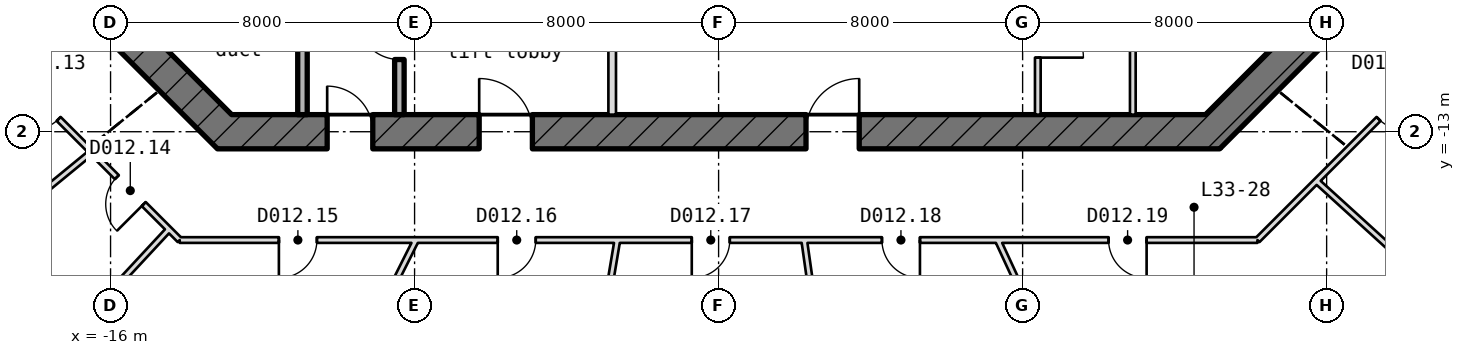
"""IFC4 building model, lengths in metres.
Left out: names, types, materials, properties, quantities, classifications, styles, units other than length and angle.
Written with IfcOpenShell. Run it as: python <this file> out.ifc"""

import sys

from ifc_helpers import new_model, si_unit, direction, frame, frame_2d, origin, place, context, subcontext, project, spatial, rectangle, extrude, element, fill, save


model = new_model("IFC4")
c1 = context("Model", 3, precision=1e-05, world=origin(), true_north=direction((0.0, 1.0)))
c2 = subcontext(c1, "Body", "Model", "MODEL_VIEW")
j1 = project(units=[si_unit("LENGTHUNIT", "METRE"), si_unit("PLANEANGLEUNIT", "RADIAN")], contexts=[c1])
p1 = place(None, origin())
s1 = spatial("IfcSite", under=j1, at=p1, CompositionType="ELEMENT")
p2 = place(p1, origin())
s2 = spatial("IfcBuilding", under=s1, at=p2, CompositionType="ELEMENT")
p3 = place(p2, frame((0.0, 0.0, 155.65)))
s3 = spatial("IfcBuildingStorey", under=s2, at=p3, CompositionType="ELEMENT", Elevation=155.65)
for number, where, z_axis, x_axis in (
    (1, (12.868, -13.132, -0.25), (0.0, 0.0, 1.0), (0.707, 0.707, 0.0)),
    (2, (-16.132, -9.868, -0.25), (0.0, 0.0, 1.0), (0.707, -0.707, 0.0)),
):
    element("IfcWall", number, at=place(p3, frame(where, z_axis=z_axis, x_axis=x_axis)), inside=s3, PredefinedType="SHEAR", context=c2, shape_type="SweptSolid", body=[
        extrude(rectangle(XDim=4.615, YDim=0.9, at=frame_2d((2.308, 0.0))), origin(), (0.0, 0.0, 1.0), 5.47),
    ])
p4 = place(p3, frame((-13.186, -13.0, -0.25), z_axis=(0.0, 0.0, 1.0), x_axis=(1.0, 0.0, 0.0)))
e3 = element("IfcWall", 3, at=p4, inside=s3, PredefinedType="SHEAR", context=c2, shape_type="SweptSolid", body=[
    extrude(rectangle(XDim=26.373, YDim=0.9, at=frame_2d((13.186, 0.0))), origin(), (0.0, 0.0, 1.0), 5.47),
])
p5 = place(p4, frame((2.886, 0.0, 0.25)))
e4 = element("IfcOpeningElement", 4, at=p5, cuts=e3, PredefinedType="OPENING", context=c2, shape_type="SweptSolid", body=[
    extrude(rectangle(XDim=1.2, YDim=2.1, at=frame_2d((0.6, 1.05))), frame((0.0, 0.46, 0.0), z_axis=(0.0, -1.0, 0.0), x_axis=(1.0, 0.0, 0.0)), (0.0, 0.0, 1.0), 0.92),
])
p6 = place(p4, frame((6.886, 0.0, 0.25)))
e5 = element("IfcOpeningElement", 5, at=p6, cuts=e3, PredefinedType="OPENING", context=c2, shape_type="SweptSolid", body=[
    extrude(rectangle(XDim=1.4, YDim=2.1, at=frame_2d((0.7, 1.05))), frame((0.0, 0.46, 0.0), z_axis=(0.0, -1.0, 0.0), x_axis=(1.0, 0.0, 0.0)), (0.0, 0.0, 1.0), 0.92),
])
p7 = place(p4, frame((15.486, 0.0, 0.25)))
e6 = element("IfcOpeningElement", 6, at=p7, cuts=e3, PredefinedType="OPENING", context=c2, shape_type="SweptSolid", body=[
    extrude(rectangle(XDim=1.4, YDim=2.1, at=frame_2d((0.7, 1.05))), frame((0.0, 0.46, 0.0), z_axis=(0.0, -1.0, 0.0), x_axis=(1.0, 0.0, 0.0)), (0.0, 0.0, 1.0), 0.92),
])
p8 = place(p3, frame((-10.95, -12.55, 0.0), z_axis=(0.0, 0.0, 1.0), x_axis=(0.0, 1.0, 0.0)))
e7 = element("IfcWall", 7, at=p8, inside=s3, PredefinedType="STANDARD", context=c2, shape_type="SweptSolid", body=[
    extrude(rectangle(XDim=3.675, YDim=0.25, at=frame_2d((1.837, 0.0))), origin(), (0.0, 0.0, 1.0), 5.22),
])
p9 = place(p3, frame((-8.4, -12.55, 0.0), z_axis=(0.0, 0.0, 1.0), x_axis=(0.0, 1.0, 0.0)))
e8 = element("IfcWall", 8, at=p9, inside=s3, PredefinedType="STANDARD", context=c2, shape_type="SweptSolid", body=[
    extrude(rectangle(XDim=3.8, YDim=0.25, at=frame_2d((1.9, 0.0))), origin(), (0.0, 0.0, 1.0), 5.22),
])
p10 = place(p9, frame((1.45, 0.0, 0.0)))
e9 = element("IfcOpeningElement", 9, at=p10, cuts=e8, PredefinedType="OPENING", context=c2, shape_type="SweptSolid", body=[
    extrude(rectangle(XDim=1.1, YDim=2.1, at=frame_2d((0.55, 1.05))), frame((0.0, 0.135, 0.0), z_axis=(0.0, -1.0, 0.0), x_axis=(1.0, 0.0, 0.0)), (0.0, 0.0, 1.0), 0.27),
])
p11 = place(p3, frame((-2.8, -12.55, 0.0), z_axis=(0.0, 0.0, 1.0), x_axis=(0.0, 1.0, 0.0)))
e10 = element("IfcWall", 10, at=p11, inside=s3, PredefinedType="PARTITIONING", context=c2, shape_type="SweptSolid", body=[
    extrude(rectangle(XDim=4.09, YDim=0.2, at=frame_2d((2.045, 0.0))), origin(), (0.0, 0.0, 1.0), 5.22),
])
p12 = place(p3, frame((8.4, -12.55, 0.0), z_axis=(0.0, 0.0, 1.0), x_axis=(0.0, 1.0, 0.0)))
e11 = element("IfcWall", 11, at=p12, inside=s3, PredefinedType="PARTITIONING", context=c2, shape_type="SweptSolid", body=[
    extrude(rectangle(XDim=4.2, YDim=0.15, at=frame_2d((2.1, 0.0))), origin(), (0.0, 0.0, 1.0), 5.22),
])
p13 = place(p12, frame((1.5, 0.0, 0.0)))
e12 = element("IfcOpeningElement", 12, at=p13, cuts=e11, PredefinedType="OPENING", context=c2, shape_type="SweptSolid", body=[
    extrude(rectangle(XDim=1.2, YDim=2.1, at=frame_2d((0.6, 1.05))), frame((0.0, 0.085, 0.0), z_axis=(0.0, -1.0, 0.0), x_axis=(1.0, 0.0, 0.0)), (0.0, 0.0, 1.0), 0.17),
])
p14 = place(p3, frame((10.9, -12.55, 0.0), z_axis=(0.0, 0.0, 1.0), x_axis=(0.0, 1.0, 0.0)))
e13 = element("IfcWall", 13, at=p14, inside=s3, PredefinedType="PARTITIONING", context=c2, shape_type="SweptSolid", body=[
    extrude(rectangle(XDim=10.125, YDim=0.15, at=frame_2d((5.062, 0.0))), origin(), (0.0, 0.0, 1.0), 5.22),
])
p15 = place(p14, frame((7.775, 0.0, 0.0)))
e14 = element("IfcOpeningElement", 14, at=p15, cuts=e13, PredefinedType="OPENING", context=c2, shape_type="SweptSolid", body=[
    extrude(rectangle(XDim=1.0, YDim=2.1, at=frame_2d((0.5, 1.05))), frame((0.0, 0.085, 0.0), z_axis=(0.0, -1.0, 0.0), x_axis=(1.0, 0.0, 0.0)), (0.0, 0.0, 1.0), 0.17),
])
p16 = place(p14, frame((2.675, 0.0, 0.0)))
e15 = element("IfcOpeningElement", 15, at=p16, cuts=e13, PredefinedType="OPENING", context=c2, shape_type="SweptSolid", body=[
    extrude(rectangle(XDim=1.0, YDim=2.1, at=frame_2d((0.5, 1.05))), frame((0.0, 0.085, 0.0), z_axis=(0.0, -1.0, 0.0), x_axis=(1.0, 0.0, 0.0)), (0.0, 0.0, 1.0), 0.17),
])
p17 = place(p3, frame((-14.18, -15.85, 0.0), z_axis=(0.0, 0.0, 1.0), x_axis=(1.0, 0.0, 0.0)))
e16 = element("IfcWall", 16, at=p17, inside=s3, PredefinedType="PARTITIONING", context=c2, shape_type="SweptSolid", body=[
    extrude(rectangle(XDim=28.361, YDim=0.15, at=frame_2d((14.18, 0.0))), origin(), (0.0, 0.0, 1.0), 5.22),
])
p18 = place(p17, frame((2.61, 0.0, 0.0)))
e17 = element("IfcOpeningElement", 17, at=p18, cuts=e16, PredefinedType="OPENING", context=c2, shape_type="SweptSolid", body=[
    extrude(rectangle(XDim=1.0, YDim=2.1, at=frame_2d((0.5, 1.05))), frame((0.0, 0.085, 0.0), z_axis=(0.0, -1.0, 0.0), x_axis=(1.0, 0.0, 0.0)), (0.0, 0.0, 1.0), 0.17),
])
p19 = place(p17, frame((8.368, 0.0, 0.0)))
e18 = element("IfcOpeningElement", 18, at=p19, cuts=e16, PredefinedType="OPENING", context=c2, shape_type="SweptSolid", body=[
    extrude(rectangle(XDim=1.0, YDim=2.1, at=frame_2d((0.5, 1.05))), frame((0.0, 0.085, 0.0), z_axis=(0.0, -1.0, 0.0), x_axis=(1.0, 0.0, 0.0)), (0.0, 0.0, 1.0), 0.17),
])
p20 = place(p17, frame((13.475, 0.0, 0.0)))
e19 = element("IfcOpeningElement", 19, at=p20, cuts=e16, PredefinedType="OPENING", context=c2, shape_type="SweptSolid", body=[
    extrude(rectangle(XDim=1.0, YDim=2.1, at=frame_2d((0.5, 1.05))), frame((0.0, 0.085, 0.0), z_axis=(0.0, -1.0, 0.0), x_axis=(1.0, 0.0, 0.0)), (0.0, 0.0, 1.0), 0.17),
])
p21 = place(p17, frame((18.479, 0.0, 0.0)))
e20 = element("IfcOpeningElement", 20, at=p21, cuts=e16, PredefinedType="OPENING", context=c2, shape_type="SweptSolid", body=[
    extrude(rectangle(XDim=1.0, YDim=2.1, at=frame_2d((0.5, 1.05))), frame((0.0, 0.085, 0.0), z_axis=(0.0, -1.0, 0.0), x_axis=(1.0, 0.0, 0.0)), (0.0, 0.0, 1.0), 0.17),
])
p22 = place(p17, frame((24.443, 0.0, 0.0)))
e21 = element("IfcOpeningElement", 21, at=p22, cuts=e16, PredefinedType="OPENING", context=c2, shape_type="SweptSolid", body=[
    extrude(rectangle(XDim=1.0, YDim=2.1, at=frame_2d((0.5, 1.05))), frame((0.0, 0.085, 0.0), z_axis=(0.0, -1.0, 0.0), x_axis=(1.0, 0.0, 0.0)), (0.0, 0.0, 1.0), 0.17),
])
p23 = place(p3, frame((14.18, -15.85, 0.0), z_axis=(0.0, 0.0, 1.0), x_axis=(0.707106781187, 0.707106781187, 0.0)))
e22 = element("IfcWall", 22, at=p23, inside=s3, PredefinedType="PARTITIONING", context=c2, shape_type="SweptSolid", body=[
    extrude(rectangle(XDim=6.604, YDim=0.15, at=frame_2d((3.302, 0.0))), origin(), (0.0, 0.0, 1.0), 5.22),
])
p24 = place(p23, frame((4.506, 0.0, 0.0)))
e23 = element("IfcOpeningElement", 23, at=p24, cuts=e22, PredefinedType="OPENING", context=c2, shape_type="SweptSolid", body=[
    extrude(rectangle(XDim=1.0, YDim=2.1, at=frame_2d((0.5, 1.05))), frame((0.0, 0.085, 0.0), z_axis=(0.0, -1.0, 0.0), x_axis=(1.0, 0.0, 0.0)), (0.0, 0.0, 1.0), 0.17),
])
p25 = place(p3, frame((-11.767, -23.429, 0.0), z_axis=(0.0, 0.0, 1.0), x_axis=(0.448824965696, 0.893619689895, 0.0)))
e24 = element("IfcWall", 24, at=p25, inside=s3, PredefinedType="PARTITIONING", context=c2, shape_type="SweptSolid", body=[
    extrude(rectangle(XDim=8.481, YDim=0.15, at=frame_2d((4.24, 0.0))), origin(), (0.0, 0.0, 1.0), 4.684),
])
p26 = place(p3, frame((-4.295, -25.557, 0.0), z_axis=(0.0, 0.0, 1.0), x_axis=(0.165706005705, 0.986175197251, 0.0)))
e25 = element("IfcWall", 25, at=p26, inside=s3, PredefinedType="PARTITIONING", context=c2, shape_type="SweptSolid", body=[
    extrude(rectangle(XDim=9.843, YDim=0.15, at=frame_2d((4.922, 0.0))), origin(), (0.0, 0.0, 1.0), 4.608),
])
p27 = place(p3, frame((3.927, -27.642, 0.0), z_axis=(0.0, 0.0, 1.0), x_axis=(-0.140640726518, 0.990060698162, 0.0)))
e26 = element("IfcWall", 26, at=p27, inside=s3, PredefinedType="PARTITIONING", context=c2, shape_type="SweptSolid", body=[
    extrude(rectangle(XDim=11.91, YDim=0.15, at=frame_2d((5.955, 0.0))), origin(), (0.0, 0.0, 1.0), 5.22),
])
p28 = place(p3, frame((11.483, -24.779, 0.0), z_axis=(0.0, 0.0, 1.0), x_axis=(-0.420442084923, 0.907319377742, 0.0)))
e27 = element("IfcWall", 27, at=p28, inside=s3, PredefinedType="PARTITIONING", context=c2, shape_type="SweptSolid", body=[
    extrude(rectangle(XDim=9.841, YDim=0.15, at=frame_2d((4.921, 0.0))), origin(), (0.0, 0.0, 1.0), 4.676),
])
p29 = place(p3, frame((-14.18, -15.85, 0.0), z_axis=(0.0, 0.0, 1.0), x_axis=(-0.707106781187, 0.707106781187, 0.0)))
e28 = element("IfcWall", 28, at=p29, inside=s3, PredefinedType="PARTITIONING", context=c2, shape_type="SweptSolid", body=[
    extrude(rectangle(XDim=0.406, YDim=0.15, at=frame_2d((0.203, 0.0))), origin(), (0.0, 0.0, 1.0), 5.22),
])
p30 = place(p3, frame((23.096, -20.984, 0.0), z_axis=(0.0, 0.0, 1.0), x_axis=(-0.740122200338, 0.672472399856, 0.0)))
e29 = element("IfcWall", 29, at=p30, inside=s3, PredefinedType="PARTITIONING", context=c2, shape_type="SweptSolid", body=[
    extrude(rectangle(XDim=9.946, YDim=0.15, at=frame_2d((4.973, 0.0))), origin(), (0.0, 0.0, 1.0), 5.22),
])
p31 = place(p3, frame((-22.506, -18.46, 0.0), z_axis=(0.0, 0.0, 1.0), x_axis=(0.773199383517, 0.634163002175, 0.0)))
e30 = element("IfcWall", 30, at=p31, inside=s3, PredefinedType="PARTITIONING", context=c2, shape_type="SweptSolid", body=[
    extrude(rectangle(XDim=7.77, YDim=0.15, at=frame_2d((3.885, 0.0))), origin(), (0.0, 0.0, 1.0), 5.22),
])
p32 = place(p3, frame((-19.497, -20.983, 0.0), z_axis=(0.0, 0.0, 1.0), x_axis=(0.680679019614, 0.732581785371, 0.0)))
e31 = element("IfcWall", 31, at=p32, inside=s3, PredefinedType="PARTITIONING", context=c2, shape_type="SweptSolid", body=[
    extrude(rectangle(XDim=7.394, YDim=0.15, at=frame_2d((3.697, 0.0))), origin(), (0.0, 0.0, 1.0), 5.22),
])
p33 = place(p3, frame((-14.46, -15.57, 0.0), z_axis=(0.0, 0.0, 1.0), x_axis=(-0.707106781187, 0.707106781187, 0.0)))
e32 = element("IfcWall", 32, at=p33, inside=s3, PredefinedType="PARTITIONING", context=c2, shape_type="SweptSolid", body=[
    extrude(rectangle(XDim=6.208, YDim=0.15, at=frame_2d((3.104, 0.0))), origin(), (0.0, 0.0, 1.0), 5.22),
])
p34 = place(p33, frame((4.11, 0.0, 0.0)))
e33 = element("IfcOpeningElement", 33, at=p34, cuts=e32, PredefinedType="OPENING", context=c2, shape_type="SweptSolid", body=[
    extrude(rectangle(XDim=1.0, YDim=2.1, at=frame_2d((0.5, 1.05))), frame((0.0, 0.085, 0.0), z_axis=(0.0, -1.0, 0.0), x_axis=(1.0, 0.0, 0.0)), (0.0, 0.0, 1.0), 0.17),
])
p35 = place(p33, frame((0.943, 0.0, 0.0)))
e34 = element("IfcOpeningElement", 34, at=p35, cuts=e32, PredefinedType="OPENING", context=c2, shape_type="SweptSolid", body=[
    extrude(rectangle(XDim=1.0, YDim=2.1, at=frame_2d((0.5, 1.05))), frame((0.0, 0.085, 0.0), z_axis=(0.0, -1.0, 0.0), x_axis=(1.0, 0.0, 0.0)), (0.0, 0.0, 1.0), 0.17),
])
p36 = place(p10, origin())
e35 = element("IfcDoor", 35, at=p36, inside=s3, OperationType="SINGLE_SWING_RIGHT", PredefinedType="DOOR", context=c2, shape_type="SweptSolid", body=[
    extrude(rectangle(XDim=1.1, YDim=2.1, at=frame_2d((0.55, 1.05))), frame((0.0, 0.025, 0.0), z_axis=(0.0, -1.0, 0.0), x_axis=(1.0, 0.0, 0.0)), (0.0, 0.0, 1.0), 0.05),
])
fill(e9, e35)
p37 = place(p5, origin())
e36 = element("IfcDoor", 36, at=p37, inside=s3, OperationType="SINGLE_SWING_RIGHT", PredefinedType="DOOR", context=c2, shape_type="SweptSolid", body=[
    extrude(rectangle(XDim=1.2, YDim=2.1, at=frame_2d((0.6, 1.05))), frame((0.0, 0.025, 0.0), z_axis=(0.0, -1.0, 0.0), x_axis=(1.0, 0.0, 0.0)), (0.0, 0.0, 1.0), 0.05),
])
fill(e4, e36)
p38 = place(p6, origin())
e37 = element("IfcDoor", 37, at=p38, inside=s3, OperationType="SINGLE_SWING_RIGHT", PredefinedType="DOOR", context=c2, shape_type="SweptSolid", body=[
    extrude(rectangle(XDim=1.4, YDim=2.1, at=frame_2d((0.7, 1.05))), frame((0.0, 0.025, 0.0), z_axis=(0.0, -1.0, 0.0), x_axis=(1.0, 0.0, 0.0)), (0.0, 0.0, 1.0), 0.05),
])
fill(e5, e37)
p39 = place(p7, origin())
e38 = element("IfcDoor", 38, at=p39, inside=s3, OperationType="SINGLE_SWING_RIGHT", PredefinedType="DOOR", context=c2, shape_type="SweptSolid", body=[
    extrude(rectangle(XDim=1.4, YDim=2.1, at=frame_2d((0.7, 1.05))), frame((0.0, 0.025, 0.0), z_axis=(0.0, -1.0, 0.0), x_axis=(1.0, 0.0, 0.0)), (0.0, 0.0, 1.0), 0.05),
])
fill(e6, e38)
p40 = place(p13, frame((1.2, 0.0, 0.0), z_axis=(0.0, 0.0, 1.0), x_axis=(-1.0, 0.0, 0.0)))
e39 = element("IfcDoor", 39, at=p40, inside=s3, OperationType="SINGLE_SWING_LEFT", PredefinedType="DOOR", context=c2, shape_type="SweptSolid", body=[
    extrude(rectangle(XDim=1.2, YDim=2.1, at=frame_2d((0.6, 1.05))), frame((0.0, 0.025, 0.0), z_axis=(0.0, -1.0, 0.0), x_axis=(1.0, 0.0, 0.0)), (0.0, 0.0, 1.0), 0.05),
])
fill(e12, e39)
p41 = place(p34, origin())
e40 = element("IfcDoor", 40, at=p41, inside=s3, OperationType="SINGLE_SWING_RIGHT", PredefinedType="DOOR", context=c2, shape_type="SweptSolid", body=[
    extrude(rectangle(XDim=1.0, YDim=2.1, at=frame_2d((0.5, 1.05))), frame((0.0, 0.025, 0.0), z_axis=(0.0, -1.0, 0.0), x_axis=(1.0, 0.0, 0.0)), (0.0, 0.0, 1.0), 0.05),
])
fill(e33, e40)
p42 = place(p35, origin())
e41 = element("IfcDoor", 41, at=p42, inside=s3, OperationType="SINGLE_SWING_RIGHT", PredefinedType="DOOR", context=c2, shape_type="SweptSolid", body=[
    extrude(rectangle(XDim=1.0, YDim=2.1, at=frame_2d((0.5, 1.05))), frame((0.0, 0.025, 0.0), z_axis=(0.0, -1.0, 0.0), x_axis=(1.0, 0.0, 0.0)), (0.0, 0.0, 1.0), 0.05),
])
fill(e34, e41)
p43 = place(p18, frame((1.0, 0.0, 0.0), z_axis=(0.0, 0.0, 1.0), x_axis=(-1.0, 0.0, 0.0)))
e42 = element("IfcDoor", 42, at=p43, inside=s3, OperationType="SINGLE_SWING_LEFT", PredefinedType="DOOR", context=c2, shape_type="SweptSolid", body=[
    extrude(rectangle(XDim=1.0, YDim=2.1, at=frame_2d((0.5, 1.05))), frame((0.0, 0.025, 0.0), z_axis=(0.0, -1.0, 0.0), x_axis=(1.0, 0.0, 0.0)), (0.0, 0.0, 1.0), 0.05),
])
fill(e17, e42)
p44 = place(p19, frame((1.0, 0.0, 0.0), z_axis=(0.0, 0.0, 1.0), x_axis=(-1.0, 0.0, 0.0)))
e43 = element("IfcDoor", 43, at=p44, inside=s3, OperationType="SINGLE_SWING_LEFT", PredefinedType="DOOR", context=c2, shape_type="SweptSolid", body=[
    extrude(rectangle(XDim=1.0, YDim=2.1, at=frame_2d((0.5, 1.05))), frame((0.0, 0.025, 0.0), z_axis=(0.0, -1.0, 0.0), x_axis=(1.0, 0.0, 0.0)), (0.0, 0.0, 1.0), 0.05),
])
fill(e18, e43)
p45 = place(p20, frame((1.0, 0.0, 0.0), z_axis=(0.0, 0.0, 1.0), x_axis=(-1.0, 0.0, 0.0)))
e44 = element("IfcDoor", 44, at=p45, inside=s3, OperationType="SINGLE_SWING_LEFT", PredefinedType="DOOR", context=c2, shape_type="SweptSolid", body=[
    extrude(rectangle(XDim=1.0, YDim=2.1, at=frame_2d((0.5, 1.05))), frame((0.0, 0.025, 0.0), z_axis=(0.0, -1.0, 0.0), x_axis=(1.0, 0.0, 0.0)), (0.0, 0.0, 1.0), 0.05),
])
fill(e19, e44)
p46 = place(p21, frame((1.0, 0.0, 0.0), z_axis=(0.0, 0.0, 1.0), x_axis=(-1.0, 0.0, 0.0)))
e45 = element("IfcDoor", 45, at=p46, inside=s3, OperationType="SINGLE_SWING_LEFT", PredefinedType="DOOR", context=c2, shape_type="SweptSolid", body=[
    extrude(rectangle(XDim=1.0, YDim=2.1, at=frame_2d((0.5, 1.05))), frame((0.0, 0.025, 0.0), z_axis=(0.0, -1.0, 0.0), x_axis=(1.0, 0.0, 0.0)), (0.0, 0.0, 1.0), 0.05),
])
fill(e20, e45)
p47 = place(p22, frame((1.0, 0.0, 0.0), z_axis=(0.0, 0.0, 1.0), x_axis=(-1.0, 0.0, 0.0)))
e46 = element("IfcDoor", 46, at=p47, inside=s3, OperationType="SINGLE_SWING_LEFT", PredefinedType="DOOR", context=c2, shape_type="SweptSolid", body=[
    extrude(rectangle(XDim=1.0, YDim=2.1, at=frame_2d((0.5, 1.05))), frame((0.0, 0.025, 0.0), z_axis=(0.0, -1.0, 0.0), x_axis=(1.0, 0.0, 0.0)), (0.0, 0.0, 1.0), 0.05),
])
fill(e21, e46)
p48 = place(p24, frame((1.0, 0.0, 0.0), z_axis=(0.0, 0.0, 1.0), x_axis=(-1.0, 0.0, 0.0)))
e47 = element("IfcDoor", 47, at=p48, inside=s3, OperationType="SINGLE_SWING_LEFT", PredefinedType="DOOR", context=c2, shape_type="SweptSolid", body=[
    extrude(rectangle(XDim=1.0, YDim=2.1, at=frame_2d((0.5, 1.05))), frame((0.0, 0.025, 0.0), z_axis=(0.0, -1.0, 0.0), x_axis=(1.0, 0.0, 0.0)), (0.0, 0.0, 1.0), 0.05),
])
fill(e23, e47)
save(model, sys.argv[1])
